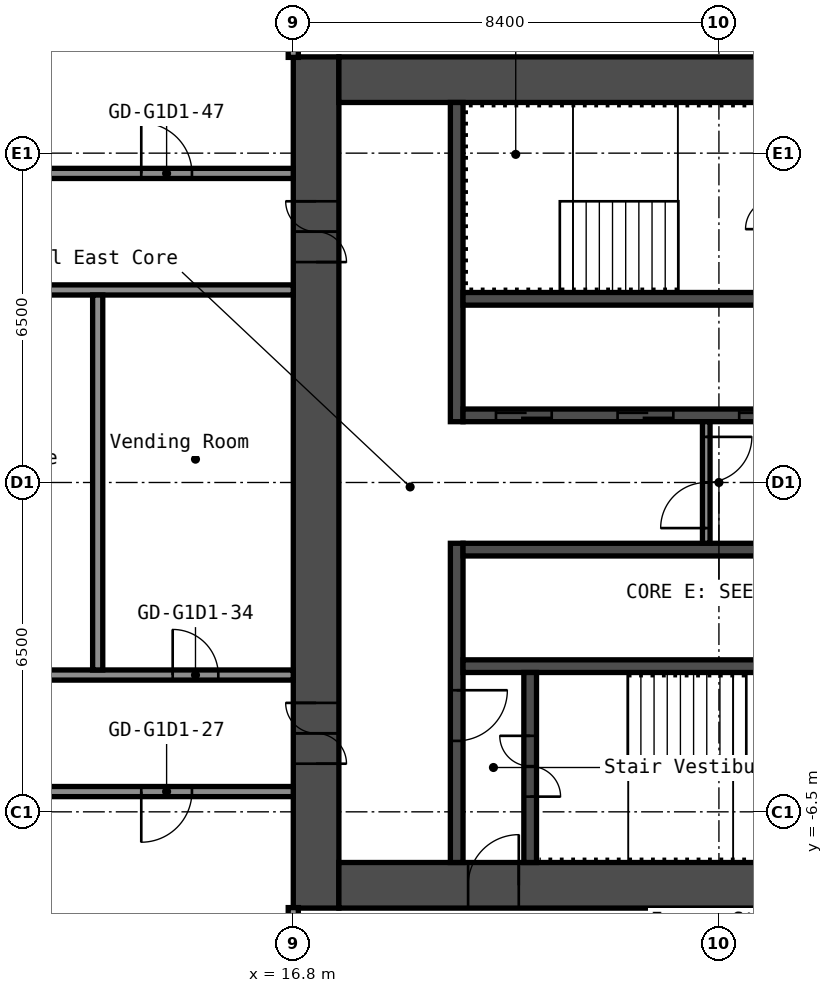
"""IFC4 building model, lengths in metres.
Left out: names, types, materials, properties, quantities, classifications, styles, units other than length and angle.
Written with IfcOpenShell. Run it as: python <this file> out.ifc"""

import sys

from ifc_helpers import new_model, si_unit, direction, frame, frame_2d, origin, place, context, subcontext, project, spatial, rectangle, extrude, element, fill, save


model = new_model("IFC4")
c1 = context("Model", 3, precision=1e-05, world=origin(), true_north=direction((0.0, 1.0)))
c2 = subcontext(c1, "Body", "Model", "MODEL_VIEW")
j1 = project(units=[si_unit("LENGTHUNIT", "METRE"), si_unit("PLANEANGLEUNIT", "RADIAN")], contexts=[c1])
p1 = place(None, origin())
s1 = spatial("IfcSite", under=j1, at=p1, CompositionType="ELEMENT")
p2 = place(p1, origin())
s2 = spatial("IfcBuilding", under=s1, at=p2, CompositionType="ELEMENT")
p3 = place(p2, frame((0.0, 0.0, 45.4)))
s3 = spatial("IfcBuildingStorey", under=s2, at=p3, CompositionType="ELEMENT", Elevation=45.4)
p4 = place(p3, frame((17.25, -8.4, 0.0), z_axis=(0.0, 0.0, 1.0), x_axis=(0.0, 1.0, 0.0)))
e1 = element("IfcWall", 1, at=p4, inside=s3, PredefinedType="SHEAR", context=c2, shape_type="SweptSolid", body=[
    extrude(rectangle(XDim=16.8, YDim=0.9, at=frame_2d((8.4, 0.0))), origin(), (0.0, 0.0, 1.0), 2.8),
])
p5 = place(p4, frame((12.75, 0.0, 0.0)))
e2 = element("IfcOpeningElement", 2, at=p5, cuts=e1, PredefinedType="OPENING", context=c2, shape_type="SweptSolid", body=[
    extrude(rectangle(XDim=1.2, YDim=2.1, at=frame_2d((0.6, 1.05))), frame((0.0, 0.46, 0.0), z_axis=(0.0, -1.0, 0.0), x_axis=(1.0, 0.0, 0.0)), (0.0, 0.0, 1.0), 0.92),
])
p6 = place(p4, frame((2.85, 0.0, 0.0)))
e3 = element("IfcOpeningElement", 3, at=p6, cuts=e1, PredefinedType="OPENING", context=c2, shape_type="SweptSolid", body=[
    extrude(rectangle(XDim=1.2, YDim=2.1, at=frame_2d((0.6, 1.05))), frame((0.0, 0.46, 0.0), z_axis=(0.0, -1.0, 0.0), x_axis=(1.0, 0.0, 0.0)), (0.0, 0.0, 1.0), 0.92),
])
p7 = place(p3, frame((17.7, 7.95, 0.0), z_axis=(0.0, 0.0, 1.0), x_axis=(1.0, 0.0, 0.0)))
e4 = element("IfcWall", 4, at=p7, inside=s3, PredefinedType="SHEAR", context=c2, shape_type="SweptSolid", body=[
    extrude(rectangle(XDim=15.0, YDim=0.9, at=frame_2d((7.5, 0.0))), origin(), (0.0, 0.0, 1.0), 2.8),
])
p8 = place(p7, frame((10.4, 0.0, 0.0)))
e5 = element("IfcOpeningElement", 5, at=p8, cuts=e4, PredefinedType="OPENING", context=c2, shape_type="SweptSolid", body=[
    extrude(rectangle(XDim=1.2, YDim=2.1, at=frame_2d((0.6, 1.05))), frame((0.0, 0.46, 0.0), z_axis=(0.0, -1.0, 0.0), x_axis=(1.0, 0.0, 0.0)), (0.0, 0.0, 1.0), 0.92),
])
p9 = place(p7, frame((13.35, 0.0, 0.0)))
e6 = element("IfcOpeningElement", 6, at=p9, cuts=e4, PredefinedType="OPENING", context=c2, shape_type="SweptSolid", body=[
    extrude(rectangle(XDim=0.9, YDim=2.1, at=frame_2d((0.45, 1.05))), frame((0.0, 0.46, 0.0), z_axis=(0.0, -1.0, 0.0), x_axis=(1.0, 0.0, 0.0)), (0.0, 0.0, 1.0), 0.92),
])
p10 = place(p3, frame((17.7, -7.95, 0.0), z_axis=(0.0, 0.0, 1.0), x_axis=(1.0, 0.0, 0.0)))
e7 = element("IfcWall", 7, at=p10, inside=s3, PredefinedType="SHEAR", context=c2, shape_type="SweptSolid", body=[
    extrude(rectangle(XDim=15.0, YDim=0.9, at=frame_2d((7.5, 0.0))), origin(), (0.0, 0.0, 1.0), 2.8),
])
p11 = place(p10, frame((2.55, 0.0, 0.0)))
e8 = element("IfcOpeningElement", 8, at=p11, cuts=e7, PredefinedType="OPENING", context=c2, shape_type="SweptSolid", body=[
    extrude(rectangle(XDim=1.0, YDim=2.1, at=frame_2d((0.5, 1.05))), frame((0.0, 0.46, 0.0), z_axis=(0.0, -1.0, 0.0), x_axis=(1.0, 0.0, 0.0)), (0.0, 0.0, 1.0), 0.92),
])
p12 = place(p3, frame((20.025, 1.2, 0.0), z_axis=(0.0, 0.0, 1.0), x_axis=(0.0, 1.0, 0.0)))
e9 = element("IfcWall", 9, at=p12, inside=s3, PredefinedType="SHEAR", context=c2, shape_type="SweptSolid", body=[
    extrude(rectangle(XDim=6.3, YDim=0.25, at=frame_2d((3.15, 0.0))), origin(), (0.0, 0.0, 1.0), 2.8),
])
p13 = place(p3, frame((20.025, -7.5, 0.0), z_axis=(0.0, 0.0, 1.0), x_axis=(0.0, 1.0, 0.0)))
e10 = element("IfcWall", 10, at=p13, inside=s3, PredefinedType="SHEAR", context=c2, shape_type="SweptSolid", body=[
    extrude(rectangle(XDim=6.3, YDim=0.25, at=frame_2d((3.15, 0.0))), origin(), (0.0, 0.0, 1.0), 2.8),
])
p14 = place(p13, frame((2.4, 0.0, 0.0)))
e11 = element("IfcOpeningElement", 11, at=p14, cuts=e10, PredefinedType="OPENING", context=c2, shape_type="SweptSolid", body=[
    extrude(rectangle(XDim=1.0, YDim=2.1, at=frame_2d((0.5, 1.05))), frame((0.0, 0.135, 0.0), z_axis=(0.0, -1.0, 0.0), x_axis=(1.0, 0.0, 0.0)), (0.0, 0.0, 1.0), 0.27),
])
p15 = place(p3, frame((20.15, 1.325, 0.0), z_axis=(0.0, 0.0, 1.0), x_axis=(1.0, 0.0, 0.0)))
e12 = element("IfcWall", 12, at=p15, inside=s3, PredefinedType="SHEAR", context=c2, shape_type="SweptSolid", body=[
    extrude(rectangle(XDim=7.5, YDim=0.25, at=frame_2d((3.75, 0.0))), origin(), (0.0, 0.0, 1.0), 2.8),
])
p16 = place(p15, frame((0.65, 0.0, 0.0)))
e13 = element("IfcOpeningElement", 13, at=p16, cuts=e12, PredefinedType="OPENING", context=c2, shape_type="SweptSolid", body=[
    extrude(rectangle(XDim=1.1, YDim=2.1, at=frame_2d((0.55, 1.05))), frame((0.0, 0.135, 0.0), z_axis=(0.0, -1.0, 0.0), x_axis=(1.0, 0.0, 0.0)), (0.0, 0.0, 1.0), 0.27),
])
p17 = place(p15, frame((3.05, 0.0, 0.0)))
e14 = element("IfcOpeningElement", 14, at=p17, cuts=e12, PredefinedType="OPENING", context=c2, shape_type="SweptSolid", body=[
    extrude(rectangle(XDim=1.1, YDim=2.1, at=frame_2d((0.55, 1.05))), frame((0.0, 0.135, 0.0), z_axis=(0.0, -1.0, 0.0), x_axis=(1.0, 0.0, 0.0)), (0.0, 0.0, 1.0), 0.27),
])
p18 = place(p15, frame((5.45, 0.0, 0.0)))
e15 = element("IfcOpeningElement", 15, at=p18, cuts=e12, PredefinedType="OPENING", context=c2, shape_type="SweptSolid", body=[
    extrude(rectangle(XDim=1.1, YDim=2.1, at=frame_2d((0.55, 1.05))), frame((0.0, 0.135, 0.0), z_axis=(0.0, -1.0, 0.0), x_axis=(1.0, 0.0, 0.0)), (0.0, 0.0, 1.0), 0.27),
])
for number, where, z_axis, x_axis in (
    (16, (20.15, 3.625, 0.0), (0.0, 0.0, 1.0), (1.0, 0.0, 0.0)),
    (17, (20.15, -1.325, 0.0), (0.0, 0.0, 1.0), (1.0, 0.0, 0.0)),
    (18, (20.15, -3.625, 0.0), (0.0, 0.0, 1.0), (1.0, 0.0, 0.0)),
):
    element("IfcWall", number, at=place(p3, frame(where, z_axis=z_axis, x_axis=x_axis)), inside=s3, PredefinedType="SHEAR", context=c2, shape_type="SweptSolid", body=[
        extrude(rectangle(XDim=7.5, YDim=0.25, at=frame_2d((3.75, 0.0))), origin(), (0.0, 0.0, 1.0), 2.8),
    ])
p19 = place(p3, frame((21.475, -7.5, 0.0), z_axis=(0.0, 0.0, 1.0), x_axis=(0.0, 1.0, 0.0)))
e19 = element("IfcWall", 19, at=p19, inside=s3, PredefinedType="SHEAR", context=c2, shape_type="SweptSolid", body=[
    extrude(rectangle(XDim=3.75, YDim=0.25, at=frame_2d((1.875, 0.0))), origin(), (0.0, 0.0, 1.0), 2.8),
])
p20 = place(p19, frame((1.3, 0.0, 0.0)))
e20 = element("IfcOpeningElement", 20, at=p20, cuts=e19, PredefinedType="OPENING", context=c2, shape_type="SweptSolid", body=[
    extrude(rectangle(XDim=1.2, YDim=2.1, at=frame_2d((0.6, 1.05))), frame((0.0, 0.135, 0.0), z_axis=(0.0, -1.0, 0.0), x_axis=(1.0, 0.0, 0.0)), (0.0, 0.0, 1.0), 0.27),
])
p21 = place(p3, frame((24.95, -1.2, 0.0), z_axis=(0.0, 0.0, 1.0), x_axis=(0.0, 1.0, 0.0)))
e21 = element("IfcWall", 21, at=p21, inside=s3, PredefinedType="PARTITIONING", context=c2, shape_type="SweptSolid", body=[
    extrude(rectangle(XDim=2.4, YDim=0.15, at=frame_2d((1.2, 0.0))), origin(), (0.0, 0.0, 1.0), 2.8),
])
p22 = place(p21, frame((0.3, 0.0, 0.0)))
e22 = element("IfcOpeningElement", 22, at=p22, cuts=e21, PredefinedType="OPENING", context=c2, shape_type="SweptSolid", body=[
    extrude(rectangle(XDim=1.8, YDim=2.1, at=frame_2d((0.9, 1.05))), frame((0.0, 0.085, 0.0), z_axis=(0.0, -1.0, 0.0), x_axis=(1.0, 0.0, 0.0)), (0.0, 0.0, 1.0), 0.17),
])
p23 = place(p3, frame((-16.8, -6.1, 0.0), z_axis=(0.0, 0.0, 1.0), x_axis=(1.0, 0.0, 0.0)))
e23 = element("IfcWall", 23, at=p23, inside=s3, PredefinedType="PARTITIONING", context=c2, shape_type="SweptSolid", body=[
    extrude(rectangle(XDim=33.6, YDim=0.2, at=frame_2d((16.8, 0.0))), origin(), (0.0, 0.0, 1.0), 2.8),
])
p24 = place(p23, frame((2.85, 0.0, 0.0)))
e24 = element("IfcOpeningElement", 24, at=p24, cuts=e23, PredefinedType="OPENING", context=c2, shape_type="SweptSolid", body=[
    extrude(rectangle(XDim=1.0, YDim=2.1, at=frame_2d((0.5, 1.05))), frame((0.0, 0.11, 0.0), z_axis=(0.0, -1.0, 0.0), x_axis=(1.0, 0.0, 0.0)), (0.0, 0.0, 1.0), 0.22),
])
p25 = place(p23, frame((4.55, 0.0, 0.0)))
e25 = element("IfcOpeningElement", 25, at=p25, cuts=e23, PredefinedType="OPENING", context=c2, shape_type="SweptSolid", body=[
    extrude(rectangle(XDim=1.0, YDim=2.1, at=frame_2d((0.5, 1.05))), frame((0.0, 0.11, 0.0), z_axis=(0.0, -1.0, 0.0), x_axis=(1.0, 0.0, 0.0)), (0.0, 0.0, 1.0), 0.22),
])
p26 = place(p23, frame((10.3, 0.0, 0.0)))
e26 = element("IfcOpeningElement", 26, at=p26, cuts=e23, PredefinedType="OPENING", context=c2, shape_type="SweptSolid", body=[
    extrude(rectangle(XDim=0.9, YDim=2.1, at=frame_2d((0.45, 1.05))), frame((0.0, 0.11, 0.0), z_axis=(0.0, -1.0, 0.0), x_axis=(1.0, 0.0, 0.0)), (0.0, 0.0, 1.0), 0.22),
])
p27 = place(p23, frame((14.5, 0.0, 0.0)))
e27 = element("IfcOpeningElement", 27, at=p27, cuts=e23, PredefinedType="OPENING", context=c2, shape_type="SweptSolid", body=[
    extrude(rectangle(XDim=0.9, YDim=2.1, at=frame_2d((0.45, 1.05))), frame((0.0, 0.11, 0.0), z_axis=(0.0, -1.0, 0.0), x_axis=(1.0, 0.0, 0.0)), (0.0, 0.0, 1.0), 0.22),
])
p28 = place(p23, frame((19.65, 0.0, 0.0)))
e28 = element("IfcOpeningElement", 28, at=p28, cuts=e23, PredefinedType="OPENING", context=c2, shape_type="SweptSolid", body=[
    extrude(rectangle(XDim=1.0, YDim=2.1, at=frame_2d((0.5, 1.05))), frame((0.0, 0.11, 0.0), z_axis=(0.0, -1.0, 0.0), x_axis=(1.0, 0.0, 0.0)), (0.0, 0.0, 1.0), 0.22),
])
p29 = place(p23, frame((21.35, 0.0, 0.0)))
e29 = element("IfcOpeningElement", 29, at=p29, cuts=e23, PredefinedType="OPENING", context=c2, shape_type="SweptSolid", body=[
    extrude(rectangle(XDim=1.0, YDim=2.1, at=frame_2d((0.5, 1.05))), frame((0.0, 0.11, 0.0), z_axis=(0.0, -1.0, 0.0), x_axis=(1.0, 0.0, 0.0)), (0.0, 0.0, 1.0), 0.22),
])
p30 = place(p23, frame((30.6, 0.0, 0.0)))
e30 = element("IfcOpeningElement", 30, at=p30, cuts=e23, PredefinedType="OPENING", context=c2, shape_type="SweptSolid", body=[
    extrude(rectangle(XDim=1.0, YDim=2.1, at=frame_2d((0.5, 1.05))), frame((0.0, 0.11, 0.0), z_axis=(0.0, -1.0, 0.0), x_axis=(1.0, 0.0, 0.0)), (0.0, 0.0, 1.0), 0.22),
])
p31 = place(p3, frame((-16.8, -3.8, 0.0), z_axis=(0.0, 0.0, 1.0), x_axis=(1.0, 0.0, 0.0)))
e31 = element("IfcWall", 31, at=p31, inside=s3, PredefinedType="PARTITIONING", context=c2, shape_type="SweptSolid", body=[
    extrude(rectangle(XDim=33.6, YDim=0.2, at=frame_2d((16.8, 0.0))), origin(), (0.0, 0.0, 1.0), 2.8),
])
p32 = place(p31, frame((9.63, 0.0, 0.0)))
e32 = element("IfcOpeningElement", 32, at=p32, cuts=e31, PredefinedType="OPENING", context=c2, shape_type="SweptSolid", body=[
    extrude(rectangle(XDim=0.9, YDim=2.1, at=frame_2d((0.45, 1.05))), frame((0.0, 0.11, 0.0), z_axis=(0.0, -1.0, 0.0), x_axis=(1.0, 0.0, 0.0)), (0.0, 0.0, 1.0), 0.22),
])
p33 = place(p31, frame((13.83, 0.0, 0.0)))
e33 = element("IfcOpeningElement", 33, at=p33, cuts=e31, PredefinedType="OPENING", context=c2, shape_type="SweptSolid", body=[
    extrude(rectangle(XDim=0.9, YDim=2.1, at=frame_2d((0.45, 1.05))), frame((0.0, 0.11, 0.0), z_axis=(0.0, -1.0, 0.0), x_axis=(1.0, 0.0, 0.0)), (0.0, 0.0, 1.0), 0.22),
])
p34 = place(p31, frame((27.02, 0.0, 0.0)))
e34 = element("IfcOpeningElement", 34, at=p34, cuts=e31, PredefinedType="OPENING", context=c2, shape_type="SweptSolid", body=[
    extrude(rectangle(XDim=0.9, YDim=2.1, at=frame_2d((0.45, 1.05))), frame((0.0, 0.11, 0.0), z_axis=(0.0, -1.0, 0.0), x_axis=(1.0, 0.0, 0.0)), (0.0, 0.0, 1.0), 0.22),
])
p35 = place(p31, frame((31.22, 0.0, 0.0)))
e35 = element("IfcOpeningElement", 35, at=p35, cuts=e31, PredefinedType="OPENING", context=c2, shape_type="SweptSolid", body=[
    extrude(rectangle(XDim=0.9, YDim=2.1, at=frame_2d((0.45, 1.05))), frame((0.0, 0.11, 0.0), z_axis=(0.0, -1.0, 0.0), x_axis=(1.0, 0.0, 0.0)), (0.0, 0.0, 1.0), 0.22),
])
p36 = place(p3, frame((-16.8, 3.8, 0.0), z_axis=(0.0, 0.0, 1.0), x_axis=(1.0, 0.0, 0.0)))
e36 = element("IfcWall", 36, at=p36, inside=s3, PredefinedType="PARTITIONING", context=c2, shape_type="SweptSolid", body=[
    extrude(rectangle(XDim=33.6, YDim=0.2, at=frame_2d((16.8, 0.0))), origin(), (0.0, 0.0, 1.0), 2.8),
])
p37 = place(p36, frame((2.07, 0.0, 0.0)))
e37 = element("IfcOpeningElement", 37, at=p37, cuts=e36, PredefinedType="OPENING", context=c2, shape_type="SweptSolid", body=[
    extrude(rectangle(XDim=0.9, YDim=2.1, at=frame_2d((0.45, 1.05))), frame((0.0, 0.11, 0.0), z_axis=(0.0, -1.0, 0.0), x_axis=(1.0, 0.0, 0.0)), (0.0, 0.0, 1.0), 0.22),
])
p38 = place(p36, frame((6.27, 0.0, 0.0)))
e38 = element("IfcOpeningElement", 38, at=p38, cuts=e36, PredefinedType="OPENING", context=c2, shape_type="SweptSolid", body=[
    extrude(rectangle(XDim=0.9, YDim=2.1, at=frame_2d((0.45, 1.05))), frame((0.0, 0.11, 0.0), z_axis=(0.0, -1.0, 0.0), x_axis=(1.0, 0.0, 0.0)), (0.0, 0.0, 1.0), 0.22),
])
p39 = place(p36, frame((18.115, 0.0, 0.0)))
e39 = element("IfcOpeningElement", 39, at=p39, cuts=e36, PredefinedType="OPENING", context=c2, shape_type="SweptSolid", body=[
    extrude(rectangle(XDim=0.9, YDim=2.1, at=frame_2d((0.45, 1.05))), frame((0.0, 0.11, 0.0), z_axis=(0.0, -1.0, 0.0), x_axis=(1.0, 0.0, 0.0)), (0.0, 0.0, 1.0), 0.22),
])
p40 = place(p36, frame((22.315, 0.0, 0.0)))
e40 = element("IfcOpeningElement", 40, at=p40, cuts=e36, PredefinedType="OPENING", context=c2, shape_type="SweptSolid", body=[
    extrude(rectangle(XDim=0.9, YDim=2.1, at=frame_2d((0.45, 1.05))), frame((0.0, 0.11, 0.0), z_axis=(0.0, -1.0, 0.0), x_axis=(1.0, 0.0, 0.0)), (0.0, 0.0, 1.0), 0.22),
])
p41 = place(p3, frame((-16.8, 6.1, 0.0), z_axis=(0.0, 0.0, 1.0), x_axis=(1.0, 0.0, 0.0)))
e41 = element("IfcWall", 41, at=p41, inside=s3, PredefinedType="PARTITIONING", context=c2, shape_type="SweptSolid", body=[
    extrude(rectangle(XDim=33.6, YDim=0.2, at=frame_2d((16.8, 0.0))), origin(), (0.0, 0.0, 1.0), 2.8),
])
p42 = place(p41, frame((2.85, 0.0, 0.0)))
e42 = element("IfcOpeningElement", 42, at=p42, cuts=e41, PredefinedType="OPENING", context=c2, shape_type="SweptSolid", body=[
    extrude(rectangle(XDim=1.0, YDim=2.1, at=frame_2d((0.5, 1.05))), frame((0.0, 0.11, 0.0), z_axis=(0.0, -1.0, 0.0), x_axis=(1.0, 0.0, 0.0)), (0.0, 0.0, 1.0), 0.22),
])
p43 = place(p41, frame((4.55, 0.0, 0.0)))
e43 = element("IfcOpeningElement", 43, at=p43, cuts=e41, PredefinedType="OPENING", context=c2, shape_type="SweptSolid", body=[
    extrude(rectangle(XDim=1.0, YDim=2.1, at=frame_2d((0.5, 1.05))), frame((0.0, 0.11, 0.0), z_axis=(0.0, -1.0, 0.0), x_axis=(1.0, 0.0, 0.0)), (0.0, 0.0, 1.0), 0.22),
])
p44 = place(p41, frame((13.8, 0.0, 0.0)))
e44 = element("IfcOpeningElement", 44, at=p44, cuts=e41, PredefinedType="OPENING", context=c2, shape_type="SweptSolid", body=[
    extrude(rectangle(XDim=1.0, YDim=2.1, at=frame_2d((0.5, 1.05))), frame((0.0, 0.11, 0.0), z_axis=(0.0, -1.0, 0.0), x_axis=(1.0, 0.0, 0.0)), (0.0, 0.0, 1.0), 0.22),
])
p45 = place(p41, frame((18.7, 0.0, 0.0)))
e45 = element("IfcOpeningElement", 45, at=p45, cuts=e41, PredefinedType="OPENING", context=c2, shape_type="SweptSolid", body=[
    extrude(rectangle(XDim=1.0, YDim=2.1, at=frame_2d((0.5, 1.05))), frame((0.0, 0.11, 0.0), z_axis=(0.0, -1.0, 0.0), x_axis=(1.0, 0.0, 0.0)), (0.0, 0.0, 1.0), 0.22),
])
p46 = place(p41, frame((30.6, 0.0, 0.0)))
e46 = element("IfcOpeningElement", 46, at=p46, cuts=e41, PredefinedType="OPENING", context=c2, shape_type="SweptSolid", body=[
    extrude(rectangle(XDim=1.0, YDim=2.1, at=frame_2d((0.5, 1.05))), frame((0.0, 0.11, 0.0), z_axis=(0.0, -1.0, 0.0), x_axis=(1.0, 0.0, 0.0)), (0.0, 0.0, 1.0), 0.22),
])
p47 = place(p3, frame((12.94, -3.7, 0.0), z_axis=(0.0, 0.0, 1.0), x_axis=(0.0, 1.0, 0.0)))
e47 = element("IfcWall", 47, at=p47, inside=s3, PredefinedType="PARTITIONING", context=c2, shape_type="SweptSolid", body=[
    extrude(rectangle(XDim=7.4, YDim=0.2, at=frame_2d((3.7, 0.0))), origin(), (0.0, 0.0, 1.0), 2.8),
])
for number, where, z_axis, x_axis in (
    (48, (16.8, -20.3, 0.0), (0.0, 0.0, 1.0), (0.0, 1.0, 0.0)),
    (49, (16.8, 8.39, 0.0), (0.0, 0.0, 1.0), (0.0, 1.0, 0.0)),
):
    element("IfcWall", number, at=place(p3, frame(where, z_axis=z_axis, x_axis=x_axis)), inside=s3, PredefinedType="PARTITIONING", context=c2, shape_type="SweptSolid", body=[
        extrude(rectangle(XDim=11.91, YDim=0.2, at=frame_2d((5.955, 0.0))), origin(), (0.0, 0.0, 1.0), 2.8),
    ])
p48 = place(p5, origin())
e50 = element("IfcDoor", 50, at=p48, inside=s3, OperationType="DOUBLE_DOOR_SINGLE_SWING", PredefinedType="DOOR", context=c2, shape_type="SweptSolid", body=[
    extrude(rectangle(XDim=1.2, YDim=2.1, at=frame_2d((0.6, 1.05))), frame((0.0, 0.025, 0.0), z_axis=(0.0, -1.0, 0.0), x_axis=(1.0, 0.0, 0.0)), (0.0, 0.0, 1.0), 0.05),
])
fill(e2, e50)
p49 = place(p6, origin())
e51 = element("IfcDoor", 51, at=p49, inside=s3, OperationType="DOUBLE_DOOR_SINGLE_SWING", PredefinedType="DOOR", context=c2, shape_type="SweptSolid", body=[
    extrude(rectangle(XDim=1.2, YDim=2.1, at=frame_2d((0.6, 1.05))), frame((0.0, 0.025, 0.0), z_axis=(0.0, -1.0, 0.0), x_axis=(1.0, 0.0, 0.0)), (0.0, 0.0, 1.0), 0.05),
])
fill(e3, e51)
p50 = place(p11, origin())
e52 = element("IfcDoor", 52, at=p50, inside=s3, OperationType="SINGLE_SWING_LEFT", PredefinedType="DOOR", context=c2, shape_type="SweptSolid", body=[
    extrude(rectangle(XDim=1.0, YDim=2.1, at=frame_2d((0.5, 1.05))), frame((0.0, 0.025, 0.0), z_axis=(0.0, -1.0, 0.0), x_axis=(1.0, 0.0, 0.0)), (0.0, 0.0, 1.0), 0.05),
])
fill(e8, e52)
p51 = place(p20, origin())
e53 = element("IfcDoor", 53, at=p51, inside=s3, OperationType="DOUBLE_DOOR_SINGLE_SWING", PredefinedType="DOOR", context=c2, shape_type="SweptSolid", body=[
    extrude(rectangle(XDim=1.2, YDim=2.1, at=frame_2d((0.6, 1.05))), frame((0.0, 0.025, 0.0), z_axis=(0.0, -1.0, 0.0), x_axis=(1.0, 0.0, 0.0)), (0.0, 0.0, 1.0), 0.05),
])
fill(e20, e53)
p52 = place(p14, origin())
e54 = element("IfcDoor", 54, at=p52, inside=s3, OperationType="SINGLE_SWING_RIGHT", PredefinedType="DOOR", context=c2, shape_type="SweptSolid", body=[
    extrude(rectangle(XDim=1.0, YDim=2.1, at=frame_2d((0.5, 1.05))), frame((0.0, 0.025, 0.0), z_axis=(0.0, -1.0, 0.0), x_axis=(1.0, 0.0, 0.0)), (0.0, 0.0, 1.0), 0.05),
])
fill(e11, e54)
p53 = place(p22, origin())
e55 = element("IfcDoor", 55, at=p53, inside=s3, OperationType="DOUBLE_DOOR_SINGLE_SWING", PredefinedType="DOOR", context=c2, shape_type="SweptSolid", body=[
    extrude(rectangle(XDim=1.8, YDim=2.1, at=frame_2d((0.9, 1.05))), frame((0.0, 0.025, 0.0), z_axis=(0.0, -1.0, 0.0), x_axis=(1.0, 0.0, 0.0)), (0.0, 0.0, 1.0), 0.05),
])
fill(e22, e55)
p54 = place(p16, origin())
e56 = element("IfcDoor", 56, at=p54, inside=s3, OperationType="DOUBLE_DOOR_SLIDING", PredefinedType="DOOR", context=c2, shape_type="SweptSolid", body=[
    extrude(rectangle(XDim=1.1, YDim=2.1, at=frame_2d((0.55, 1.05))), frame((0.0, 0.025, 0.0), z_axis=(0.0, -1.0, 0.0), x_axis=(1.0, 0.0, 0.0)), (0.0, 0.0, 1.0), 0.05),
])
fill(e13, e56)
p55 = place(p17, origin())
e57 = element("IfcDoor", 57, at=p55, inside=s3, OperationType="DOUBLE_DOOR_SLIDING", PredefinedType="DOOR", context=c2, shape_type="SweptSolid", body=[
    extrude(rectangle(XDim=1.1, YDim=2.1, at=frame_2d((0.55, 1.05))), frame((0.0, 0.025, 0.0), z_axis=(0.0, -1.0, 0.0), x_axis=(1.0, 0.0, 0.0)), (0.0, 0.0, 1.0), 0.05),
])
fill(e14, e57)
p56 = place(p18, origin())
e58 = element("IfcDoor", 58, at=p56, inside=s3, OperationType="DOUBLE_DOOR_SLIDING", PredefinedType="DOOR", context=c2, shape_type="SweptSolid", body=[
    extrude(rectangle(XDim=1.1, YDim=2.1, at=frame_2d((0.55, 1.05))), frame((0.0, 0.025, 0.0), z_axis=(0.0, -1.0, 0.0), x_axis=(1.0, 0.0, 0.0)), (0.0, 0.0, 1.0), 0.05),
])
fill(e15, e58)
p57 = place(p30, origin())
e59 = element("IfcDoor", 59, at=p57, inside=s3, OperationType="SINGLE_SWING_LEFT", PredefinedType="DOOR", context=c2, shape_type="SweptSolid", body=[
    extrude(rectangle(XDim=1.0, YDim=2.1, at=frame_2d((0.5, 1.05))), frame((0.0, 0.025, 0.0), z_axis=(0.0, -1.0, 0.0), x_axis=(1.0, 0.0, 0.0)), (0.0, 0.0, 1.0), 0.05),
])
fill(e30, e59)
p58 = place(p35, origin())
e60 = element("IfcDoor", 60, at=p58, inside=s3, OperationType="SINGLE_SWING_RIGHT", PredefinedType="DOOR", context=c2, shape_type="SweptSolid", body=[
    extrude(rectangle(XDim=0.9, YDim=2.1, at=frame_2d((0.45, 1.05))), frame((0.0, 0.025, 0.0), z_axis=(0.0, -1.0, 0.0), x_axis=(1.0, 0.0, 0.0)), (0.0, 0.0, 1.0), 0.05),
])
fill(e35, e60)
p59 = place(p46, origin())
e61 = element("IfcDoor", 61, at=p59, inside=s3, OperationType="SINGLE_SWING_RIGHT", PredefinedType="DOOR", context=c2, shape_type="SweptSolid", body=[
    extrude(rectangle(XDim=1.0, YDim=2.1, at=frame_2d((0.5, 1.05))), frame((0.0, 0.025, 0.0), z_axis=(0.0, -1.0, 0.0), x_axis=(1.0, 0.0, 0.0)), (0.0, 0.0, 1.0), 0.05),
])
fill(e46, e61)
save(model, sys.argv[1])
